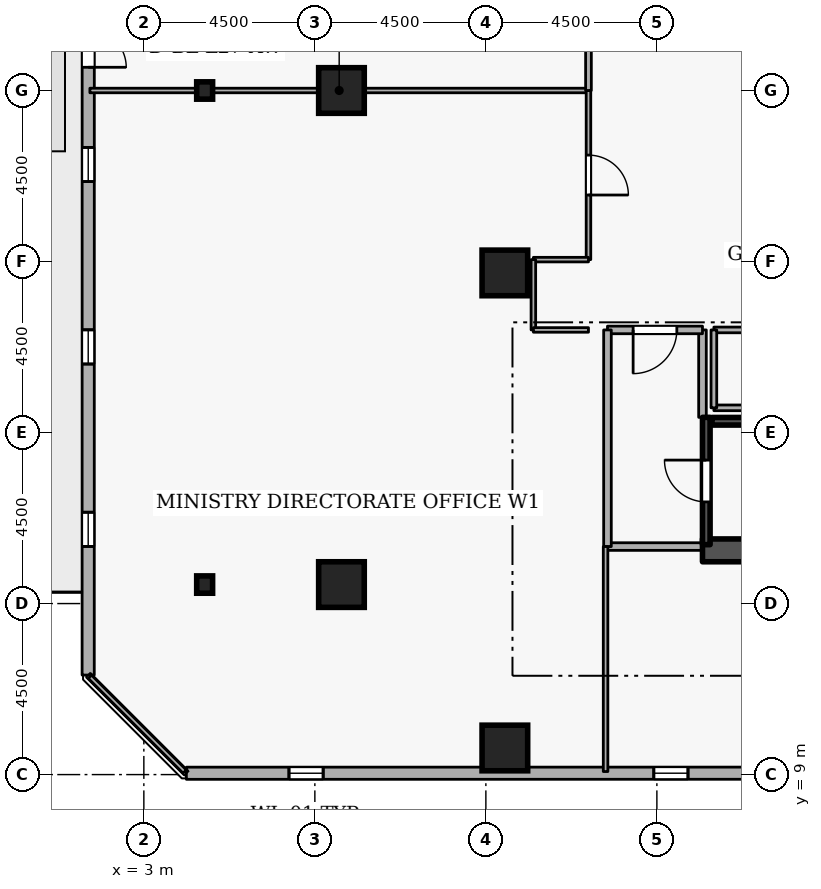
"""IFC4 building model, lengths in metres.
Left out: names, types, materials, properties, quantities, classifications, styles, units other than length and angle.
Written with IfcOpenShell. Run it as: python <this file> out.ifc"""

import sys

from ifc_helpers import new_model, si_unit, direction, frame, frame_2d, origin, origin_2d, place, context, subcontext, project, spatial, rectangle, i_section, extrude, element, fill, save


model = new_model("IFC4")
c1 = context("Model", 3, precision=1e-05, world=origin(), true_north=direction((0.0, 1.0)))
c2 = subcontext(c1, "Body", "Model", "MODEL_VIEW")
j1 = project(units=[si_unit("LENGTHUNIT", "METRE"), si_unit("PLANEANGLEUNIT", "RADIAN")], contexts=[c1])
p1 = place(None, origin())
s1 = spatial("IfcSite", under=j1, at=p1, CompositionType="ELEMENT")
p2 = place(p1, origin())
s2 = spatial("IfcBuilding", under=s1, at=p2, CompositionType="ELEMENT")
p3 = place(p2, frame((0.0, 0.0, 105.3)))
s3 = spatial("IfcBuildingStorey", under=s2, at=p3, CompositionType="ELEMENT", Elevation=105.3)
p4 = place(p3, frame((17.7, 14.9, 0.0), z_axis=(0.0, 0.0, 1.0), x_axis=(1.0, 0.0, 0.0)))
e1 = element("IfcWall", 1, at=p4, inside=s3, PredefinedType="SHEAR", context=c2, shape_type="SweptSolid", body=[
    extrude(rectangle(XDim=15.6, YDim=0.6, at=frame_2d((7.8, 0.0))), origin(), (0.0, 0.0, 1.0), 3.6),
])
for number, where, z_axis, x_axis in (
    (2, (12.5, 9.7, 0.0), (0.0, 0.0, 1.0), (1.0, 0.0, 0.0)),
    (3, (8.2, 14.0, 0.0), (0.0, 0.0, 1.0), (1.0, 0.0, 0.0)),
    (4, (8.2, 27.0, 0.0), (0.0, 0.0, 1.0), (1.0, 0.0, 0.0)),
    (5, (12.5, 22.2, 0.0), (0.0, 0.0, 1.0), (1.0, 0.0, 0.0)),
):
    element("IfcColumn", number, at=place(p3, frame(where, z_axis=z_axis, x_axis=x_axis)), inside=s3, PredefinedType="COLUMN", context=c2, shape_type="SweptSolid", body=[
        extrude(rectangle(XDim=1.2, YDim=1.2, at=origin_2d()), origin(), (0.0, 0.0, 1.0), 3.6),
    ])
for number, where, z_axis, x_axis in (
    (6, (4.6, 14.0, 0.0), (0.0, 0.0, 1.0), (1.0, 0.0, 0.0)),
    (7, (4.6, 27.0, 0.0), (0.0, 0.0, 1.0), (1.0, 0.0, 0.0)),
):
    element("IfcColumn", number, at=place(p3, frame(where, z_axis=z_axis, x_axis=x_axis)), inside=s3, PredefinedType="COLUMN", context=c2, shape_type="SweptSolid", body=[
        extrude(i_section(OverallWidth=0.418, OverallDepth=0.456, WebThickness=0.042, FlangeThickness=0.067, FilletRadius=0.015, at=origin_2d()), origin(), (0.0, 0.0, 1.0), 3.6),
    ])
p5 = place(p3, frame((4.119, 9.035, 0.0), z_axis=(0.0, 0.0, 1.0), x_axis=(0.999999996067, 8.8693006e-05, 0.0)))
e8 = element("IfcWall", 8, at=p5, inside=s3, PredefinedType="STANDARD", context=c2, shape_type="SweptSolid", body=[
    extrude(rectangle(XDim=35.784, YDim=0.32, at=frame_2d((17.892, 0.0))), origin(), (0.0, 0.0, 1.0), 2.7),
])
p6 = place(p5, frame((2.7, 0.0, 0.72)))
e9 = element("IfcOpeningElement", 9, at=p6, cuts=e8, PredefinedType="OPENING", context=c2, shape_type="SweptSolid", body=[
    extrude(rectangle(XDim=0.9, YDim=1.75, at=frame_2d((0.45, 0.875))), frame((0.0, 0.17, 0.0), z_axis=(0.0, -1.0, 0.0), x_axis=(1.0, 0.0, 0.0)), (0.0, 0.0, 1.0), 0.34),
])
p7 = place(p5, frame((12.3, 0.0, 0.72)))
e10 = element("IfcOpeningElement", 10, at=p7, cuts=e8, PredefinedType="OPENING", context=c2, shape_type="SweptSolid", body=[
    extrude(rectangle(XDim=0.9, YDim=1.75, at=frame_2d((0.45, 0.875))), frame((0.0, 0.17, 0.0), z_axis=(0.0, -1.0, 0.0), x_axis=(1.0, 0.0, 0.0)), (0.0, 0.0, 1.0), 0.34),
])
p8 = place(p5, frame((17.1, 0.0, 0.72)))
e11 = element("IfcOpeningElement", 11, at=p8, cuts=e8, PredefinedType="OPENING", context=c2, shape_type="SweptSolid", body=[
    extrude(rectangle(XDim=0.9, YDim=1.75, at=frame_2d((0.45, 0.875))), frame((0.0, 0.17, 0.0), z_axis=(0.0, -1.0, 0.0), x_axis=(1.0, 0.0, 0.0)), (0.0, 0.0, 1.0), 0.34),
])
p9 = place(p5, frame((26.7, 0.0, 0.72)))
e12 = element("IfcOpeningElement", 12, at=p9, cuts=e8, PredefinedType="OPENING", context=c2, shape_type="SweptSolid", body=[
    extrude(rectangle(XDim=0.9, YDim=1.75, at=frame_2d((0.45, 0.875))), frame((0.0, 0.17, 0.0), z_axis=(0.0, -1.0, 0.0), x_axis=(1.0, 0.0, 0.0)), (0.0, 0.0, 1.0), 0.34),
])
p10 = place(p5, frame((31.5, 0.0, 0.72)))
e13 = element("IfcOpeningElement", 13, at=p10, cuts=e8, PredefinedType="OPENING", context=c2, shape_type="SweptSolid", body=[
    extrude(rectangle(XDim=0.9, YDim=1.75, at=frame_2d((0.45, 0.875))), frame((0.0, 0.17, 0.0), z_axis=(0.0, -1.0, 0.0), x_axis=(1.0, 0.0, 0.0)), (0.0, 0.0, 1.0), 0.34),
])
p11 = place(p3, frame((1.539, 47.403, 0.0), z_axis=(0.0, 0.0, 1.0), x_axis=(-8.8693006e-05, -0.999999996067, 0.0)))
e14 = element("IfcWall", 14, at=p11, inside=s3, PredefinedType="STANDARD", context=c2, shape_type="SweptSolid", body=[
    extrude(rectangle(XDim=35.784, YDim=0.32, at=frame_2d((17.892, 0.0))), origin(), (0.0, 0.0, 1.0), 2.7),
])
p12 = place(p11, frame((18.792, 0.0, 0.0)))
e15 = element("IfcOpeningElement", 15, at=p12, cuts=e14, PredefinedType="OPENING", context=c2, shape_type="SweptSolid", body=[
    extrude(rectangle(XDim=1.0, YDim=2.08, at=frame_2d((0.5, 1.04))), frame((0.0, 0.17, 0.0), z_axis=(0.0, -1.0, 0.0), x_axis=(1.0, 0.0, 0.0)), (0.0, 0.0, 1.0), 0.34),
])
p13 = place(p11, frame((2.7, 0.0, 0.72)))
e16 = element("IfcOpeningElement", 16, at=p13, cuts=e14, PredefinedType="OPENING", context=c2, shape_type="SweptSolid", body=[
    extrude(rectangle(XDim=0.9, YDim=1.75, at=frame_2d((0.45, 0.875))), frame((0.0, 0.17, 0.0), z_axis=(0.0, -1.0, 0.0), x_axis=(1.0, 0.0, 0.0)), (0.0, 0.0, 1.0), 0.34),
])
p14 = place(p11, frame((7.5, 0.0, 0.72)))
e17 = element("IfcOpeningElement", 17, at=p14, cuts=e14, PredefinedType="OPENING", context=c2, shape_type="SweptSolid", body=[
    extrude(rectangle(XDim=0.9, YDim=1.75, at=frame_2d((0.45, 0.875))), frame((0.0, 0.17, 0.0), z_axis=(0.0, -1.0, 0.0), x_axis=(1.0, 0.0, 0.0)), (0.0, 0.0, 1.0), 0.34),
])
p15 = place(p11, frame((12.3, 0.0, 0.72)))
e18 = element("IfcOpeningElement", 18, at=p15, cuts=e14, PredefinedType="OPENING", context=c2, shape_type="SweptSolid", body=[
    extrude(rectangle(XDim=0.9, YDim=1.75, at=frame_2d((0.45, 0.875))), frame((0.0, 0.17, 0.0), z_axis=(0.0, -1.0, 0.0), x_axis=(1.0, 0.0, 0.0)), (0.0, 0.0, 1.0), 0.34),
])
p16 = place(p11, frame((17.1, 0.0, 0.72)))
e19 = element("IfcOpeningElement", 19, at=p16, cuts=e14, PredefinedType="OPENING", context=c2, shape_type="SweptSolid", body=[
    extrude(rectangle(XDim=0.9, YDim=1.75, at=frame_2d((0.45, 0.875))), frame((0.0, 0.17, 0.0), z_axis=(0.0, -1.0, 0.0), x_axis=(1.0, 0.0, 0.0)), (0.0, 0.0, 1.0), 0.34),
])
p17 = place(p11, frame((21.9, 0.0, 0.72)))
e20 = element("IfcOpeningElement", 20, at=p17, cuts=e14, PredefinedType="OPENING", context=c2, shape_type="SweptSolid", body=[
    extrude(rectangle(XDim=0.9, YDim=1.75, at=frame_2d((0.45, 0.875))), frame((0.0, 0.17, 0.0), z_axis=(0.0, -1.0, 0.0), x_axis=(1.0, 0.0, 0.0)), (0.0, 0.0, 1.0), 0.34),
])
p18 = place(p11, frame((26.7, 0.0, 0.72)))
e21 = element("IfcOpeningElement", 21, at=p18, cuts=e14, PredefinedType="OPENING", context=c2, shape_type="SweptSolid", body=[
    extrude(rectangle(XDim=0.9, YDim=1.75, at=frame_2d((0.45, 0.875))), frame((0.0, 0.17, 0.0), z_axis=(0.0, -1.0, 0.0), x_axis=(1.0, 0.0, 0.0)), (0.0, 0.0, 1.0), 0.34),
])
p19 = place(p11, frame((31.5, 0.0, 0.72)))
e22 = element("IfcOpeningElement", 22, at=p19, cuts=e14, PredefinedType="OPENING", context=c2, shape_type="SweptSolid", body=[
    extrude(rectangle(XDim=0.9, YDim=1.75, at=frame_2d((0.45, 0.875))), frame((0.0, 0.17, 0.0), z_axis=(0.0, -1.0, 0.0), x_axis=(1.0, 0.0, 0.0)), (0.0, 0.0, 1.0), 0.34),
])
p20 = place(p3, frame((17.8, 15.05, 0.0), z_axis=(0.0, 0.0, 1.0), x_axis=(0.0, 1.0, 0.0)))
e23 = element("IfcWall", 23, at=p20, inside=s3, PredefinedType="SHEAR", context=c2, shape_type="SweptSolid", body=[
    extrude(rectangle(XDim=3.35, YDim=0.2, at=frame_2d((1.675, 0.0))), origin(), (0.0, 0.0, 1.0), 3.6),
])
p21 = place(p20, frame((1.125, 0.0, 0.0)))
e24 = element("IfcOpeningElement", 24, at=p21, cuts=e23, PredefinedType="OPENING", context=c2, shape_type="SweptSolid", body=[
    extrude(rectangle(XDim=1.1, YDim=2.1, at=frame_2d((0.55, 1.05))), frame((0.0, 0.11, 0.0), z_axis=(0.0, -1.0, 0.0), x_axis=(1.0, 0.0, 0.0)), (0.0, 0.0, 1.0), 0.22),
])
p22 = place(p3, frame((25.05, 18.297, 0.0), z_axis=(0.0, 0.0, 1.0), x_axis=(-1.0, 0.0, 0.0)))
e25 = element("IfcWall", 25, at=p22, inside=s3, PredefinedType="SHEAR", context=c2, shape_type="SweptSolid", body=[
    extrude(rectangle(XDim=7.1, YDim=0.2, at=frame_2d((3.55, 0.0))), origin(), (0.0, 0.0, 1.0), 3.6),
])
p23 = place(p3, frame((15.2, 15.0, 0.0), z_axis=(0.0, 0.0, 1.0), x_axis=(1.0, 0.0, 0.0)))
e26 = element("IfcWall", 26, at=p23, inside=s3, PredefinedType="STANDARD", context=c2, shape_type="SweptSolid", body=[
    extrude(rectangle(XDim=2.5, YDim=0.2, at=frame_2d((1.25, 0.0))), origin(), (0.0, 0.0, 1.0), 3.34),
])
p24 = place(p3, frame((17.7, 18.4, 0.0), z_axis=(0.0, 0.0, 1.0), x_axis=(0.0, 1.0, 0.0)))
e27 = element("IfcWall", 27, at=p24, inside=s3, PredefinedType="STANDARD", context=c2, shape_type="SweptSolid", body=[
    extrude(rectangle(XDim=2.3, YDim=0.2, at=frame_2d((1.15, 0.0))), origin(), (0.0, 0.0, 1.0), 2.545),
])
p25 = place(p3, frame((17.7, 20.7, 0.0), z_axis=(0.0, 0.0, 1.0), x_axis=(-1.0, 0.0, 0.0)))
e28 = element("IfcWall", 28, at=p25, inside=s3, PredefinedType="STANDARD", context=c2, shape_type="SweptSolid", body=[
    extrude(rectangle(XDim=2.5, YDim=0.2, at=frame_2d((1.25, 0.0))), origin(), (0.0, 0.0, 1.0), 3.34),
])
p26 = place(p25, frame((0.675, 0.0, 0.0)))
e29 = element("IfcOpeningElement", 29, at=p26, cuts=e28, PredefinedType="OPENING", context=c2, shape_type="SweptSolid", body=[
    extrude(rectangle(XDim=1.15, YDim=2.1, at=frame_2d((0.575, 1.05))), frame((0.0, 0.11, 0.0), z_axis=(0.0, -1.0, 0.0), x_axis=(1.0, 0.0, 0.0)), (0.0, 0.0, 1.0), 0.22),
])
p27 = place(p3, frame((15.2, 20.7, 0.0), z_axis=(0.0, 0.0, 1.0), x_axis=(0.0, -1.0, 0.0)))
e30 = element("IfcWall", 30, at=p27, inside=s3, PredefinedType="STANDARD", context=c2, shape_type="SweptSolid", body=[
    extrude(rectangle(XDim=5.7, YDim=0.2, at=frame_2d((2.85, 0.0))), origin(), (0.0, 0.0, 1.0), 3.34),
])
p28 = place(p3, frame((18.0, 18.65, 0.0), z_axis=(0.0, 0.0, 1.0), x_axis=(1.0, 0.0, 0.0)))
e31 = element("IfcWall", 31, at=p28, inside=s3, PredefinedType="PARTITIONING", context=c2, shape_type="SweptSolid", body=[
    extrude(rectangle(XDim=2.6, YDim=0.15, at=frame_2d((1.3, 0.0))), origin(), (0.0, 0.0, 1.0), 3.34),
])
p29 = place(p3, frame((20.6, 20.7, 0.0), z_axis=(0.0, 0.0, 1.0), x_axis=(-1.0, 0.0, 0.0)))
e32 = element("IfcWall", 32, at=p29, inside=s3, PredefinedType="PARTITIONING", context=c2, shape_type="SweptSolid", body=[
    extrude(rectangle(XDim=2.6, YDim=0.15, at=frame_2d((1.3, 0.0))), origin(), (0.0, 0.0, 1.0), 3.34),
])
p30 = place(p29, frame((0.84, 0.0, 0.0)))
e33 = element("IfcOpeningElement", 33, at=p30, cuts=e32, PredefinedType="OPENING", context=c2, shape_type="SweptSolid", body=[
    extrude(rectangle(XDim=0.92, YDim=2.08, at=frame_2d((0.46, 1.04))), frame((0.0, 0.085, 0.0), z_axis=(0.0, -1.0, 0.0), x_axis=(1.0, 0.0, 0.0)), (0.0, 0.0, 1.0), 0.17),
])
p31 = place(p3, frame((18.0, 20.7, 0.0), z_axis=(0.0, 0.0, 1.0), x_axis=(0.0, -1.0, 0.0)))
e34 = element("IfcWall", 34, at=p31, inside=s3, PredefinedType="PARTITIONING", context=c2, shape_type="SweptSolid", body=[
    extrude(rectangle(XDim=2.05, YDim=0.15, at=frame_2d((1.025, 0.0))), origin(), (0.0, 0.0, 1.0), 2.545),
])
p32 = place(p3, frame((1.58, 27.0, 0.0), z_axis=(0.0, 0.0, 1.0), x_axis=(1.0, 0.0, 0.0)))
e35 = element("IfcWall", 35, at=p32, inside=s3, PredefinedType="PARTITIONING", context=c2, shape_type="SweptSolid", body=[
    extrude(rectangle(XDim=13.12, YDim=0.12, at=frame_2d((6.56, 0.0))), origin(), (0.0, 0.0, 1.0), 2.878),
])
p33 = place(p3, frame((14.7, 27.0, 0.0), z_axis=(0.0, 0.0, 1.0), x_axis=(0.0, -1.0, 0.0)))
e36 = element("IfcWall", 36, at=p33, inside=s3, PredefinedType="PARTITIONING", context=c2, shape_type="SweptSolid", body=[
    extrude(rectangle(XDim=4.45, YDim=0.12, at=frame_2d((2.225, 0.0))), origin(), (0.0, 0.0, 1.0), 3.34),
])
p34 = place(p33, frame((1.7, 0.0, 0.0)))
e37 = element("IfcOpeningElement", 37, at=p34, cuts=e36, PredefinedType="OPENING", context=c2, shape_type="SweptSolid", body=[
    extrude(rectangle(XDim=1.05, YDim=2.1, at=frame_2d((0.525, 1.05))), frame((0.0, 0.07, 0.0), z_axis=(0.0, -1.0, 0.0), x_axis=(1.0, 0.0, 0.0)), (0.0, 0.0, 1.0), 0.14),
])
p35 = place(p3, frame((14.7, 22.55, 0.0), z_axis=(0.0, 0.0, 1.0), x_axis=(-1.0, 0.0, 0.0)))
e38 = element("IfcWall", 38, at=p35, inside=s3, PredefinedType="PARTITIONING", context=c2, shape_type="SweptSolid", body=[
    extrude(rectangle(XDim=1.45, YDim=0.12, at=frame_2d((0.725, 0.0))), origin(), (0.0, 0.0, 1.0), 3.34),
])
p36 = place(p3, frame((13.25, 22.55, 0.0), z_axis=(0.0, 0.0, 1.0), x_axis=(0.0, -1.0, 0.0)))
e39 = element("IfcWall", 39, at=p36, inside=s3, PredefinedType="PARTITIONING", context=c2, shape_type="SweptSolid", body=[
    extrude(rectangle(XDim=1.85, YDim=0.12, at=frame_2d((0.925, 0.0))), origin(), (0.0, 0.0, 1.0), 3.34),
])
p37 = place(p3, frame((13.25, 20.7, 0.0), z_axis=(0.0, 0.0, 1.0), x_axis=(1.0, 0.0, 0.0)))
e40 = element("IfcWall", 40, at=p37, inside=s3, PredefinedType="PARTITIONING", context=c2, shape_type="SweptSolid", body=[
    extrude(rectangle(XDim=1.45, YDim=0.12, at=frame_2d((0.725, 0.0))), origin(), (0.0, 0.0, 1.0), 3.34),
])
p38 = place(p3, frame((15.15, 15.0, 0.0), z_axis=(0.0, 0.0, 1.0), x_axis=(0.0, -1.0, 0.0)))
e41 = element("IfcWall", 41, at=p38, inside=s3, PredefinedType="PARTITIONING", context=c2, shape_type="SweptSolid", body=[
    extrude(rectangle(XDim=5.92, YDim=0.12, at=frame_2d((2.96, 0.0))), origin(), (0.0, 0.0, 1.0), 3.34),
])
p39 = place(p3, frame((4.075, 9.08, 0.0), z_axis=(0.0, 0.0, 1.0), x_axis=(-0.707106781187, 0.707106781187, 0.0)))
e42 = element("IfcWall", 42, at=p39, inside=s3, PredefinedType="PARTITIONING", context=c2, shape_type="SweptSolid", body=[
    extrude(rectangle(XDim=3.528, YDim=0.12, at=frame_2d((1.764, 0.0))), origin(), (0.0, 0.0, 1.0), 3.34),
])
p40 = place(p3, frame((14.7, 31.45, 0.0), z_axis=(0.0, 0.0, 1.0), x_axis=(0.0, -1.0, 0.0)))
e43 = element("IfcWall", 43, at=p40, inside=s3, PredefinedType="PARTITIONING", context=c2, shape_type="SweptSolid", body=[
    extrude(rectangle(XDim=4.45, YDim=0.15, at=frame_2d((2.225, 0.0))), origin(), (0.0, 0.0, 1.0), 3.34),
])
p41 = place(p40, frame((1.575, 0.0, 0.0)))
e44 = element("IfcOpeningElement", 44, at=p41, cuts=e43, PredefinedType="OPENING", context=c2, shape_type="SweptSolid", body=[
    extrude(rectangle(XDim=1.3, YDim=2.12, at=frame_2d((0.65, 1.06))), frame((0.0, 0.085, 0.0), z_axis=(0.0, -1.0, 0.0), x_axis=(1.0, 0.0, 0.0)), (0.0, 0.0, 1.0), 0.17),
])
p42 = place(p6, origin())
e45 = element("IfcWindow", 45, at=p42, inside=s3, PartitioningType="SINGLE_PANEL", PredefinedType="WINDOW", context=c2, shape_type="SweptSolid", body=[
    extrude(rectangle(XDim=0.9, YDim=1.75, at=frame_2d((0.45, 0.875))), frame((0.0, 0.03, 0.0), z_axis=(0.0, -1.0, 0.0), x_axis=(1.0, 0.0, 0.0)), (0.0, 0.0, 1.0), 0.06),
])
fill(e9, e45)
p43 = place(p7, origin())
e46 = element("IfcWindow", 46, at=p43, inside=s3, PartitioningType="SINGLE_PANEL", PredefinedType="WINDOW", context=c2, shape_type="SweptSolid", body=[
    extrude(rectangle(XDim=0.9, YDim=1.75, at=frame_2d((0.45, 0.875))), frame((0.0, 0.03, 0.0), z_axis=(0.0, -1.0, 0.0), x_axis=(1.0, 0.0, 0.0)), (0.0, 0.0, 1.0), 0.06),
])
fill(e10, e46)
p44 = place(p12, origin())
e47 = element("IfcDoor", 47, at=p44, inside=s3, OperationType="SINGLE_SWING_RIGHT", PredefinedType="DOOR", context=c2, shape_type="SweptSolid", body=[
    extrude(rectangle(XDim=1.0, YDim=2.08, at=frame_2d((0.5, 1.04))), frame((0.0, 0.025, 0.0), z_axis=(0.0, -1.0, 0.0), x_axis=(1.0, 0.0, 0.0)), (0.0, 0.0, 1.0), 0.05),
])
fill(e15, e47)
p45 = place(p17, origin())
e48 = element("IfcWindow", 48, at=p45, inside=s3, PartitioningType="SINGLE_PANEL", PredefinedType="WINDOW", context=c2, shape_type="SweptSolid", body=[
    extrude(rectangle(XDim=0.9, YDim=1.75, at=frame_2d((0.45, 0.875))), frame((0.0, 0.03, 0.0), z_axis=(0.0, -1.0, 0.0), x_axis=(1.0, 0.0, 0.0)), (0.0, 0.0, 1.0), 0.06),
])
fill(e20, e48)
p46 = place(p18, origin())
e49 = element("IfcWindow", 49, at=p46, inside=s3, PartitioningType="SINGLE_PANEL", PredefinedType="WINDOW", context=c2, shape_type="SweptSolid", body=[
    extrude(rectangle(XDim=0.9, YDim=1.75, at=frame_2d((0.45, 0.875))), frame((0.0, 0.03, 0.0), z_axis=(0.0, -1.0, 0.0), x_axis=(1.0, 0.0, 0.0)), (0.0, 0.0, 1.0), 0.06),
])
fill(e21, e49)
p47 = place(p19, origin())
e50 = element("IfcWindow", 50, at=p47, inside=s3, PartitioningType="SINGLE_PANEL", PredefinedType="WINDOW", context=c2, shape_type="SweptSolid", body=[
    extrude(rectangle(XDim=0.9, YDim=1.75, at=frame_2d((0.45, 0.875))), frame((0.0, 0.03, 0.0), z_axis=(0.0, -1.0, 0.0), x_axis=(1.0, 0.0, 0.0)), (0.0, 0.0, 1.0), 0.06),
])
fill(e22, e50)
p48 = place(p21, origin())
e51 = element("IfcDoor", 51, at=p48, inside=s3, OperationType="SINGLE_SWING_RIGHT", PredefinedType="DOOR", context=c2, shape_type="SweptSolid", body=[
    extrude(rectangle(XDim=1.1, YDim=2.1, at=frame_2d((0.55, 1.05))), frame((0.0, 0.025, 0.0), z_axis=(0.0, -1.0, 0.0), x_axis=(1.0, 0.0, 0.0)), (0.0, 0.0, 1.0), 0.05),
])
fill(e24, e51)
p49 = place(p26, origin())
e52 = element("IfcDoor", 52, at=p49, inside=s3, OperationType="SINGLE_SWING_RIGHT", PredefinedType="DOOR", context=c2, shape_type="SweptSolid", body=[
    extrude(rectangle(XDim=1.15, YDim=2.1, at=frame_2d((0.575, 1.05))), frame((0.0, 0.025, 0.0), z_axis=(0.0, -1.0, 0.0), x_axis=(1.0, 0.0, 0.0)), (0.0, 0.0, 1.0), 0.05),
])
fill(e29, e52)
p50 = place(p34, origin())
e53 = element("IfcDoor", 53, at=p50, inside=s3, OperationType="SINGLE_SWING_RIGHT", PredefinedType="DOOR", context=c2, shape_type="SweptSolid", body=[
    extrude(rectangle(XDim=1.05, YDim=2.1, at=frame_2d((0.525, 1.05))), frame((0.0, 0.025, 0.0), z_axis=(0.0, -1.0, 0.0), x_axis=(1.0, 0.0, 0.0)), (0.0, 0.0, 1.0), 0.05),
])
fill(e37, e53)
save(model, sys.argv[1])
